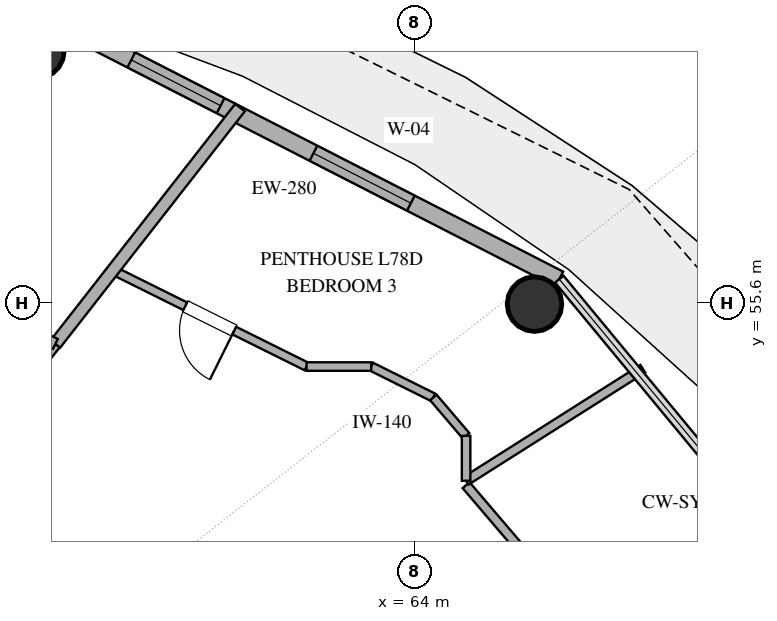
"""IFC4 building model, lengths in metres.
Left out: names, types, materials, properties, quantities, classifications, styles, units other than length and angle.
Written with IfcOpenShell. Run it as: python <this file> out.ifc"""

import sys

from ifc_helpers import new_model, si_unit, direction, frame, frame_2d, origin, origin_2d, place, context, subcontext, project, spatial, rectangle, hollow_circle, extrude, element, fill, save


model = new_model("IFC4")
c1 = context("Model", 3, precision=1e-05, world=origin(), true_north=direction((0.0, 1.0)))
c2 = subcontext(c1, "Body", "Model", "MODEL_VIEW")
j1 = project(units=[si_unit("LENGTHUNIT", "METRE"), si_unit("PLANEANGLEUNIT", "RADIAN")], contexts=[c1])
p1 = place(None, origin())
s1 = spatial("IfcSite", under=j1, at=p1, CompositionType="ELEMENT")
p2 = place(p1, origin())
s2 = spatial("IfcBuilding", under=s1, at=p2, CompositionType="ELEMENT")
p3 = place(p2, frame((0.0, 0.0, 301.8)))
s3 = spatial("IfcBuildingStorey", under=s2, at=p3, CompositionType="ELEMENT", Elevation=301.8)
for number, where, z_axis, x_axis in (
    (1, (65.975, 55.576, 0.0), (0.0, 0.0, 1.0), (1.0, 0.0, 0.0)),
    (2, (57.791, 59.739, 0.0), (0.0, 0.0, 1.0), (1.0, 0.0, 0.0)),
):
    element("IfcColumn", number, at=place(p3, frame(where, z_axis=z_axis, x_axis=x_axis)), inside=s3, PredefinedType="COLUMN", context=c2, shape_type="SweptSolid", body=[
        extrude(hollow_circle(Radius=0.45, WallThickness=0.025, at=origin_2d()), origin(), (0.0, 0.0, 1.0), 3.37),
    ])
p4 = place(p3, frame((66.383, 55.987, 0.0), z_axis=(0.0, 0.0, 1.0), x_axis=(-0.890007394051, 0.455946091699, 0.0)))
e3 = element("IfcWall", 3, at=p4, inside=s3, PredefinedType="SOLIDWALL", context=c2, shape_type="SweptSolid", body=[
    extrude(rectangle(XDim=9.404, YDim=0.28, at=frame_2d((4.702, 0.0))), origin(), (0.0, 0.0, 1.0), 3.37),
])
p5 = place(p4, frame((2.742, 0.0, 0.85)))
e4 = element("IfcOpeningElement", 4, at=p5, cuts=e3, PredefinedType="OPENING", context=c2, shape_type="SweptSolid", body=[
    extrude(rectangle(XDim=1.8, YDim=2.2, at=frame_2d((0.9, 1.1))), frame((0.0, 0.15, 0.0), z_axis=(0.0, -1.0, 0.0), x_axis=(1.0, 0.0, 0.0)), (0.0, 0.0, 1.0), 0.3),
])
p6 = place(p4, frame((6.258, 0.0, 0.85)))
e5 = element("IfcOpeningElement", 5, at=p6, cuts=e3, PredefinedType="OPENING", context=c2, shape_type="SweptSolid", body=[
    extrude(rectangle(XDim=1.65, YDim=2.0, at=frame_2d((0.825, 1.0))), frame((0.0, 0.15, 0.0), z_axis=(0.0, -1.0, 0.0), x_axis=(1.0, 0.0, 0.0)), (0.0, 0.0, 1.0), 0.3),
])
p7 = place(p3, frame((68.481, 48.345, 0.0), z_axis=(0.0, 0.0, 1.0), x_axis=(-0.649208179997, 0.760610767097, 0.0)))
e6 = element("IfcWall", 6, at=p7, inside=s3, PredefinedType="PARTITIONING", context=c2, shape_type="SweptSolid", body=[
    extrude(rectangle(XDim=5.593, YDim=0.15, at=frame_2d((2.796, 0.0))), origin(), (0.0, 0.0, 1.0), 2.73),
])
p8 = place(p7, frame((2.346, 0.0, 0.0)))
e7 = element("IfcOpeningElement", 7, at=p8, cuts=e6, PredefinedType="OPENING", context=c2, shape_type="SweptSolid", body=[
    extrude(rectangle(XDim=0.9, YDim=2.1, at=frame_2d((0.45, 1.05))), frame((0.0, 0.085, 0.0), z_axis=(0.0, -1.0, 0.0), x_axis=(1.0, 0.0, 0.0)), (0.0, 0.0, 1.0), 0.17),
])
p9 = place(p3, frame((58.096, 54.922, 0.0), z_axis=(0.0, 0.0, 1.0), x_axis=(-0.615652044057, -0.788018122031, 0.0)))
e8 = element("IfcWall", 8, at=p9, inside=s3, PredefinedType="PLUMBINGWALL", context=c2, shape_type="SweptSolid", body=[
    extrude(rectangle(XDim=4.144, YDim=0.18, at=frame_2d((2.072, 0.0))), origin(), (0.0, 0.0, 1.0), 2.73),
])
p10 = place(p3, frame((62.227, 54.55, 0.0), z_axis=(0.0, 0.0, 1.0), x_axis=(-0.895591084679, 0.444878195739, 0.0)))
e9 = element("IfcWall", 9, at=p10, inside=s3, PredefinedType="PARTITIONING", context=c2, shape_type="SweptSolid", body=[
    extrude(rectangle(XDim=3.557, YDim=0.14, at=frame_2d((1.778, 0.0))), origin(), (0.0, 0.0, 1.0), 2.73),
])
p11 = place(p10, frame((1.328, 0.0, 0.0)))
e10 = element("IfcOpeningElement", 10, at=p11, cuts=e9, PredefinedType="OPENING", context=c2, shape_type="SweptSolid", body=[
    extrude(rectangle(XDim=0.9, YDim=2.1, at=frame_2d((0.45, 1.05))), frame((0.0, 0.08, 0.0), z_axis=(0.0, -1.0, 0.0), x_axis=(1.0, 0.0, 0.0)), (0.0, 0.0, 1.0), 0.16),
])
p12 = place(p3, frame((64.85, 52.672, 0.0), z_axis=(0.0, 0.0, 1.0), x_axis=(0.84478165195, 0.535111166515, 0.0)))
e11 = element("IfcWall", 11, at=p12, inside=s3, PredefinedType="PARTITIONING", context=c2, shape_type="SweptSolid", body=[
    extrude(rectangle(XDim=3.44, YDim=0.15, at=frame_2d((1.72, 0.0))), origin(), (0.0, 0.0, 1.0), 2.73),
])
p13 = place(p3, frame((58.096, 54.922, 0.0), z_axis=(0.0, 0.0, 1.0), x_axis=(0.615676703635, 0.78799885571, 0.0)))
e12 = element("IfcWall", 12, at=p13, inside=s3, PredefinedType="PARTITIONING", context=c2, shape_type="SweptSolid", body=[
    extrude(rectangle(XDim=4.932, YDim=0.2, at=frame_2d((2.466, 0.0))), origin(), (0.0, 0.0, 1.0), 2.73),
])
p14 = place(p3, frame((56.024, 55.932, 0.0), z_axis=(0.0, 0.0, 1.0), x_axis=(0.898893612682, -0.438166946585, 0.0)))
e13 = element("IfcWall", 13, at=p14, inside=s3, PredefinedType="PLUMBINGWALL", context=c2, shape_type="SweptSolid", body=[
    extrude(rectangle(XDim=2.305, YDim=0.18, at=frame_2d((1.153, 0.0))), origin(), (0.0, 0.0, 1.0), 2.73),
])
p15 = place(p3, frame((64.311, 54.042, 0.0), z_axis=(0.0, 0.0, 1.0), x_axis=(-0.895409226325, 0.445244109912, 0.0)))
e14 = element("IfcWall", 14, at=p15, inside=s3, PredefinedType="PARTITIONING", context=c2, shape_type="SweptSolid", body=[
    extrude(rectangle(XDim=1.141, YDim=0.14, at=frame_2d((0.571, 0.0))), origin(), (0.0, 0.0, 1.0), 2.73),
])
p16 = place(p3, frame((63.289, 54.55, 0.0), z_axis=(0.0, 0.0, 1.0), x_axis=(-1.0, 0.0, 0.0)))
e15 = element("IfcWall", 15, at=p16, inside=s3, PredefinedType="PARTITIONING", context=c2, shape_type="SweptSolid", body=[
    extrude(rectangle(XDim=1.062, YDim=0.14, at=frame_2d((0.531, 0.0))), origin(), (0.0, 0.0, 1.0), 2.73),
])
p17 = place(p3, frame((64.85, 53.41, 0.0), z_axis=(0.0, 0.0, 1.0), x_axis=(-0.649191857323, 0.760624698774, 0.0)))
e16 = element("IfcWall", 16, at=p17, inside=s3, PredefinedType="PARTITIONING", context=c2, shape_type="SweptSolid", body=[
    extrude(rectangle(XDim=0.83, YDim=0.14, at=frame_2d((0.415, 0.0))), origin(), (0.0, 0.0, 1.0), 2.73),
])
p18 = place(p3, frame((64.85, 52.672, 0.0), z_axis=(0.0, 0.0, 1.0), x_axis=(0.0, 1.0, 0.0)))
e17 = element("IfcWall", 17, at=p18, inside=s3, PredefinedType="PARTITIONING", context=c2, shape_type="SweptSolid", body=[
    extrude(rectangle(XDim=0.739, YDim=0.14, at=frame_2d((0.369, 0.0))), origin(), (0.0, 0.0, 1.0), 2.73),
])
p19 = place(p5, origin())
e18 = element("IfcWindow", 18, at=p19, inside=s3, PartitioningType="SINGLE_PANEL", PredefinedType="WINDOW", context=c2, shape_type="SweptSolid", body=[
    extrude(rectangle(XDim=1.8, YDim=2.2, at=frame_2d((0.9, 1.1))), frame((0.0, 0.03, 0.0), z_axis=(0.0, -1.0, 0.0), x_axis=(1.0, 0.0, 0.0)), (0.0, 0.0, 1.0), 0.06),
])
fill(e4, e18)
p20 = place(p6, origin())
e19 = element("IfcWindow", 19, at=p20, inside=s3, PartitioningType="SINGLE_PANEL", PredefinedType="WINDOW", context=c2, shape_type="SweptSolid", body=[
    extrude(rectangle(XDim=1.65, YDim=2.0, at=frame_2d((0.825, 1.0))), frame((0.0, 0.03, 0.0), z_axis=(0.0, -1.0, 0.0), x_axis=(1.0, 0.0, 0.0)), (0.0, 0.0, 1.0), 0.06),
])
fill(e5, e19)
p21 = place(p11, origin())
e20 = element("IfcDoor", 20, at=p21, inside=s3, OperationType="SINGLE_SWING_LEFT", PredefinedType="DOOR", context=c2, shape_type="SweptSolid", body=[
    extrude(rectangle(XDim=0.9, YDim=2.1, at=frame_2d((0.45, 1.05))), frame((0.0, 0.025, 0.0), z_axis=(0.0, -1.0, 0.0), x_axis=(1.0, 0.0, 0.0)), (0.0, 0.0, 1.0), 0.05),
])
fill(e10, e20)
save(model, sys.argv[1])
